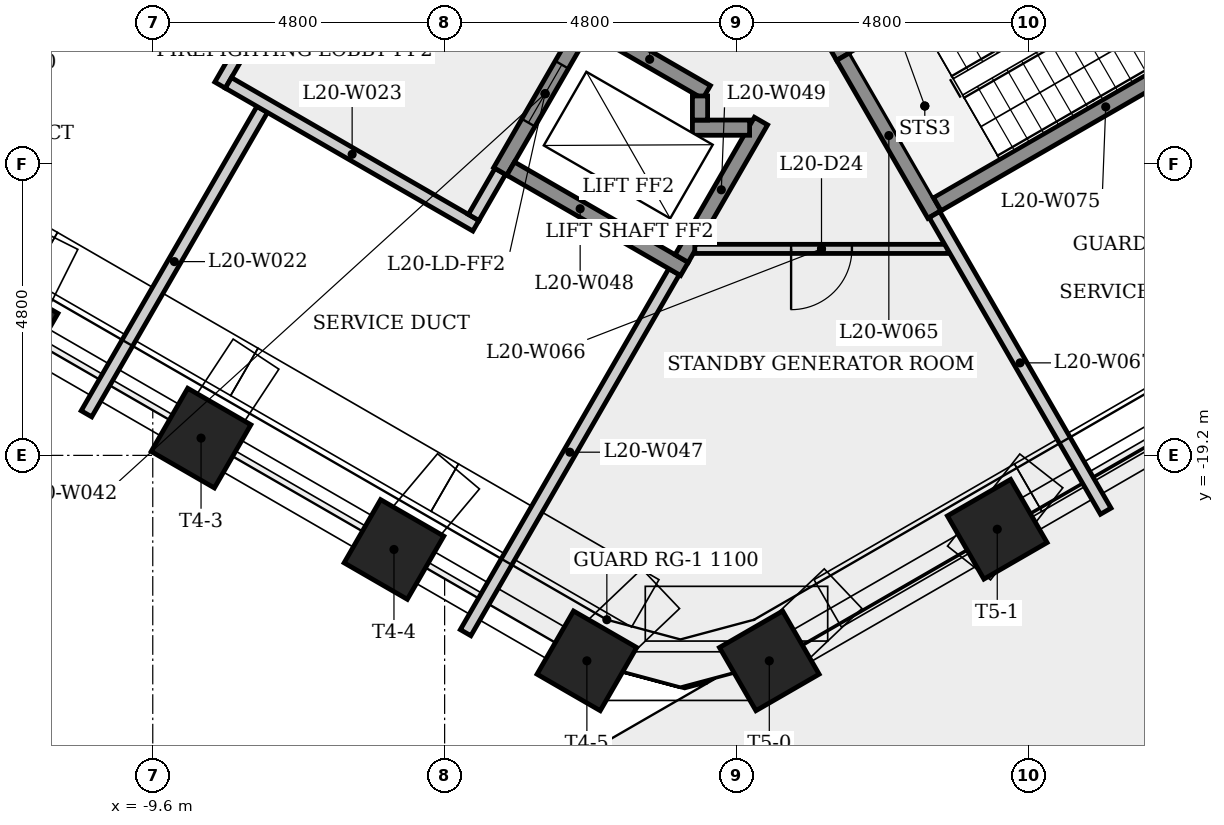
"""IFC4 building model, lengths in metres.
Left out: names, types, materials, properties, quantities, classifications, styles, units other than length and angle.
Written with IfcOpenShell. Run it as: python <this file> out.ifc"""

import sys

from ifc_helpers import new_model, si_unit, direction, frame, frame_2d, origin, origin_2d, place, context, subcontext, project, spatial, rectangle, extrude, element, fill, save


model = new_model("IFC4")
c1 = context("Model", 3, precision=1e-05, world=origin(), true_north=direction((0.0, 1.0)))
c2 = subcontext(c1, "Body", "Model", "MODEL_VIEW")
j1 = project(units=[si_unit("LENGTHUNIT", "METRE"), si_unit("PLANEANGLEUNIT", "RADIAN")], contexts=[c1])
p1 = place(None, origin())
s1 = spatial("IfcSite", under=j1, at=p1, CompositionType="ELEMENT")
p2 = place(p1, origin())
s2 = spatial("IfcBuilding", under=s1, at=p2, CompositionType="ELEMENT")
p3 = place(p2, frame((0.0, 0.0, 78.3)))
s3 = spatial("IfcBuildingStorey", under=s2, at=p3, CompositionType="ELEMENT", Elevation=78.3)
for number, where, z_axis, x_axis in (
    (1, (-11.979, -17.084, 0.0), (0.0, 0.0, 1.0), (-0.5, -0.866, 0.0)),
    (2, (-8.806, -18.916, 0.0), (0.0, 0.0, 1.0), (-0.5, -0.866, 0.0)),
    (3, (-5.633, -20.748, 0.0), (0.0, 0.0, 1.0), (-0.5, -0.866, 0.0)),
    (4, (-2.46, -22.579, 0.0), (0.0, 0.0, 1.0), (-0.5, -0.866, 0.0)),
    (5, (0.54, -22.579, 0.0), (0.0, 0.0, 1.0), (0.5, -0.866, 0.0)),
    (6, (4.289, -20.415, 0.0), (0.0, 0.0, 1.0), (0.5, -0.866, 0.0)),
):
    element("IfcColumn", number, at=place(p3, frame(where, z_axis=z_axis, x_axis=x_axis)), inside=s3, PredefinedType="COLUMN", context=c2, shape_type="SweptSolid", body=[
        extrude(rectangle(XDim=1.2, YDim=1.2, at=origin_2d()), origin(), (0.0, 0.0, 1.0), 4.45),
    ])
p4 = place(p3, frame((-8.493, -13.11, 0.0), z_axis=(0.0, 0.0, 1.0), x_axis=(0.500067724834, 0.865986299303, 0.0)))
e7 = element("IfcWall", 7, at=p4, inside=s3, PredefinedType="PLUMBINGWALL", context=c2, shape_type="SweptSolid", body=[
    extrude(rectangle(XDim=0.775, YDim=0.2, at=frame_2d((0.388, 0.0))), origin(), (0.0, 0.0, 1.0), 4.45),
])
p5 = place(p3, frame((-7.8, -13.51, 0.0), z_axis=(0.0, 0.0, 1.0), x_axis=(-0.499982030767, -0.866035778077, 0.0)))
e8 = element("IfcWall", 8, at=p5, inside=s3, PredefinedType="PLUMBINGWALL", context=c2, shape_type="SweptSolid", body=[
    extrude(rectangle(XDim=5.781, YDim=0.2, at=frame_2d((2.89, 0.0))), origin(), (0.0, 0.0, 1.0), 4.45),
])
p6 = place(p3, frame((-8.356, -13.073, 0.0), z_axis=(0.0, 0.0, 1.0), x_axis=(0.866038532462, -0.499977259774, 0.0)))
e9 = element("IfcWall", 9, at=p6, inside=s3, PredefinedType="PLUMBINGWALL", context=c2, shape_type="SweptSolid", body=[
    extrude(rectangle(XDim=4.7, YDim=0.2, at=frame_2d((2.35, 0.0))), origin(), (0.0, 0.0, 1.0), 4.45),
])
p7 = place(p3, frame((-3.885, -14.529, 0.0), z_axis=(0.0, 0.0, 1.0), x_axis=(-0.499859285417, -0.866106630146, 0.0)))
e10 = element("IfcWall", 10, at=p7, inside=s3, PredefinedType="PLUMBINGWALL", context=c2, shape_type="SweptSolid", body=[
    extrude(rectangle(XDim=0.875, YDim=0.2, at=frame_2d((0.438, 0.0))), origin(), (0.0, 0.0, 1.0), 4.45),
])
p8 = place(p3, frame((-2.41, -11.974, 0.0), z_axis=(0.0, 0.0, 1.0), x_axis=(-0.500001826776, -0.866024349092, 0.0)))
e11 = element("IfcWall", 11, at=p8, inside=s3, PredefinedType="SHEAR", context=c2, shape_type="SweptSolid", body=[
    extrude(rectangle(XDim=2.95, YDim=0.25, at=frame_2d((1.475, 0.0))), origin(), (0.0, 0.0, 1.0), 4.45),
])
p9 = place(p8, frame((0.925, 0.0, 0.0)))
e12 = element("IfcOpeningElement", 12, at=p9, cuts=e11, PredefinedType="OPENING", context=c2, shape_type="SweptSolid", body=[
    extrude(rectangle(XDim=1.1, YDim=2.1, at=frame_2d((0.55, 1.05))), frame((0.0, 0.135, 0.0), z_axis=(0.0, -1.0, 0.0), x_axis=(1.0, 0.0, 0.0)), (0.0, 0.0, 1.0), 0.27),
])
p10 = place(p3, frame((-2.364, -12.145, 0.0), z_axis=(0.0, 0.0, 1.0), x_axis=(0.86603892542, -0.499976579108, 0.0)))
e13 = element("IfcWall", 13, at=p10, inside=s3, PredefinedType="SHEAR", context=c2, shape_type="SweptSolid", body=[
    extrude(rectangle(XDim=2.162, YDim=0.25, at=frame_2d((1.081, 0.0))), origin(), (0.0, 0.0, 1.0), 4.45),
])
p11 = place(p3, frame((-1.027, -16.179, 0.0), z_axis=(0.0, 0.0, 1.0), x_axis=(-0.499984476993, -0.866034365811, 0.0)))
e14 = element("IfcWall", 14, at=p11, inside=s3, PredefinedType="PLUMBINGWALL", context=c2, shape_type="SweptSolid", body=[
    extrude(rectangle(XDim=6.856, YDim=0.2, at=frame_2d((3.428, 0.0))), origin(), (0.0, 0.0, 1.0), 4.45),
])
p12 = place(p3, frame((-0.856, -16.133, 0.0), z_axis=(0.0, 0.0, 1.0), x_axis=(-0.866021716278, 0.500006386895, 0.0)))
e15 = element("IfcWall", 15, at=p12, inside=s3, PredefinedType="SHEAR", context=c2, shape_type="SweptSolid", body=[
    extrude(rectangle(XDim=3.3, YDim=0.25, at=frame_2d((1.65, 0.0))), origin(), (0.0, 0.0, 1.0), 4.45),
])
p13 = place(p3, frame((-0.902, -15.962, 0.0), z_axis=(0.0, 0.0, 1.0), x_axis=(0.499981517636, 0.866036074319, 0.0)))
e16 = element("IfcWall", 16, at=p13, inside=s3, PredefinedType="SHEAR", context=c2, shape_type="SweptSolid", body=[
    extrude(rectangle(XDim=2.61, YDim=0.25, at=frame_2d((1.305, 0.0))), origin(), (0.0, 0.0, 1.0), 4.45),
])
p14 = place(p3, frame((-0.725, -13.81, 0.0), z_axis=(0.0, 0.0, 1.0), x_axis=(1.0, 0.0, 0.0)))
e17 = element("IfcWall", 17, at=p14, inside=s3, PredefinedType="SHEAR", context=c2, shape_type="SweptSolid", body=[
    extrude(rectangle(XDim=0.941, YDim=0.25, at=frame_2d((0.47, 0.0))), origin(), (0.0, 0.0, 1.0), 4.8),
])
p15 = place(p3, frame((-0.6, -13.289, 0.0), z_axis=(0.0, 0.0, 1.0), x_axis=(0.0, -1.0, 0.0)))
e18 = element("IfcWall", 18, at=p15, inside=s3, PredefinedType="SHEAR", context=c2, shape_type="SweptSolid", body=[
    extrude(rectangle(XDim=0.396, YDim=0.25, at=frame_2d((0.198, 0.0))), origin(), (0.0, 0.0, 1.0), 4.8),
])
p16 = place(p3, frame((1.585, -12.595, 0.0), z_axis=(0.0, 0.0, 1.0), x_axis=(0.866036417653, 0.499980922934, 0.0)))
e19 = element("IfcWall", 19, at=p16, inside=s3, PredefinedType="SHEAR", context=c2, shape_type="SweptSolid", body=[
    extrude(rectangle(XDim=6.65, YDim=0.25, at=frame_2d((3.325, 0.0))), origin(), (0.0, 0.0, 1.0), 4.45),
])
p17 = place(p16, frame((5.275, 0.0, 0.0)))
e20 = element("IfcOpeningElement", 20, at=p17, cuts=e19, PredefinedType="OPENING", context=c2, shape_type="SweptSolid", body=[
    extrude(rectangle(XDim=1.0, YDim=2.1, at=frame_2d((0.5, 1.05))), frame((0.0, 0.135, 0.0), z_axis=(0.0, -1.0, 0.0), x_axis=(1.0, 0.0, 0.0)), (0.0, 0.0, 1.0), 0.27),
])
p18 = place(p3, frame((3.256, -15.239, 0.0), z_axis=(0.0, 0.0, 1.0), x_axis=(-0.50002537861, 0.866010750942, 0.0)))
e21 = element("IfcWall", 21, at=p18, inside=s3, PredefinedType="SHEAR", context=c2, shape_type="SweptSolid", body=[
    extrude(rectangle(XDim=3.0, YDim=0.25, at=frame_2d((1.5, 0.0))), origin(), (0.0, 0.0, 1.0), 4.45),
])
p19 = place(p3, frame((3.482, -15.804, 0.0), z_axis=(0.0, 0.0, 1.0), x_axis=(-1.0, 0.0, 0.0)))
e22 = element("IfcWall", 22, at=p19, inside=s3, PredefinedType="PARTITIONING", context=c2, shape_type="SweptSolid", body=[
    extrude(rectangle(XDim=4.167, YDim=0.15, at=frame_2d((2.083, 0.0))), origin(), (0.0, 0.0, 1.0), 4.45),
])
p20 = place(p19, frame((1.583, 0.0, 0.0)))
e23 = element("IfcOpeningElement", 23, at=p20, cuts=e22, PredefinedType="OPENING", context=c2, shape_type="SweptSolid", body=[
    extrude(rectangle(XDim=1.0, YDim=2.1, at=frame_2d((0.5, 1.05))), frame((0.0, 0.085, 0.0), z_axis=(0.0, -1.0, 0.0), x_axis=(1.0, 0.0, 0.0)), (0.0, 0.0, 1.0), 0.17),
])
p21 = place(p3, frame((3.256, -15.239, 0.0), z_axis=(0.0, 0.0, 1.0), x_axis=(0.499988783044, -0.8660318798, 0.0)))
e24 = element("IfcWall", 24, at=p21, inside=s3, PredefinedType="PLUMBINGWALL", context=c2, shape_type="SweptSolid", body=[
    extrude(rectangle(XDim=5.634, YDim=0.2, at=frame_2d((2.817, 0.0))), origin(), (0.0, 0.0, 1.0), 4.45),
])
p22 = place(p3, frame((3.301, -15.068, 0.0), z_axis=(0.0, 0.0, 1.0), x_axis=(0.866035036182, 0.499983315828, 0.0)))
e25 = element("IfcWall", 25, at=p22, inside=s3, PredefinedType="SHEAR", context=c2, shape_type="SweptSolid", body=[
    extrude(rectangle(XDim=6.4, YDim=0.25, at=frame_2d((3.2, 0.0))), origin(), (0.0, 0.0, 1.0), 4.45),
])
p23 = place(p9, origin())
e26 = element("IfcDoor", 26, at=p23, inside=s3, OperationType="SLIDING_TO_LEFT", PredefinedType="DOOR", context=c2, shape_type="SweptSolid", body=[
    extrude(rectangle(XDim=1.1, YDim=2.1, at=frame_2d((0.55, 1.05))), frame((0.0, 0.025, 0.0), z_axis=(0.0, -1.0, 0.0), x_axis=(1.0, 0.0, 0.0)), (0.0, 0.0, 1.0), 0.05),
])
fill(e12, e26)
p24 = place(p20, origin())
e27 = element("IfcDoor", 27, at=p24, inside=s3, OperationType="SINGLE_SWING_RIGHT", PredefinedType="DOOR", context=c2, shape_type="SweptSolid", body=[
    extrude(rectangle(XDim=1.0, YDim=2.1, at=frame_2d((0.5, 1.05))), frame((0.0, 0.025, 0.0), z_axis=(0.0, -1.0, 0.0), x_axis=(1.0, 0.0, 0.0)), (0.0, 0.0, 1.0), 0.05),
])
fill(e23, e27)
save(model, sys.argv[1])
